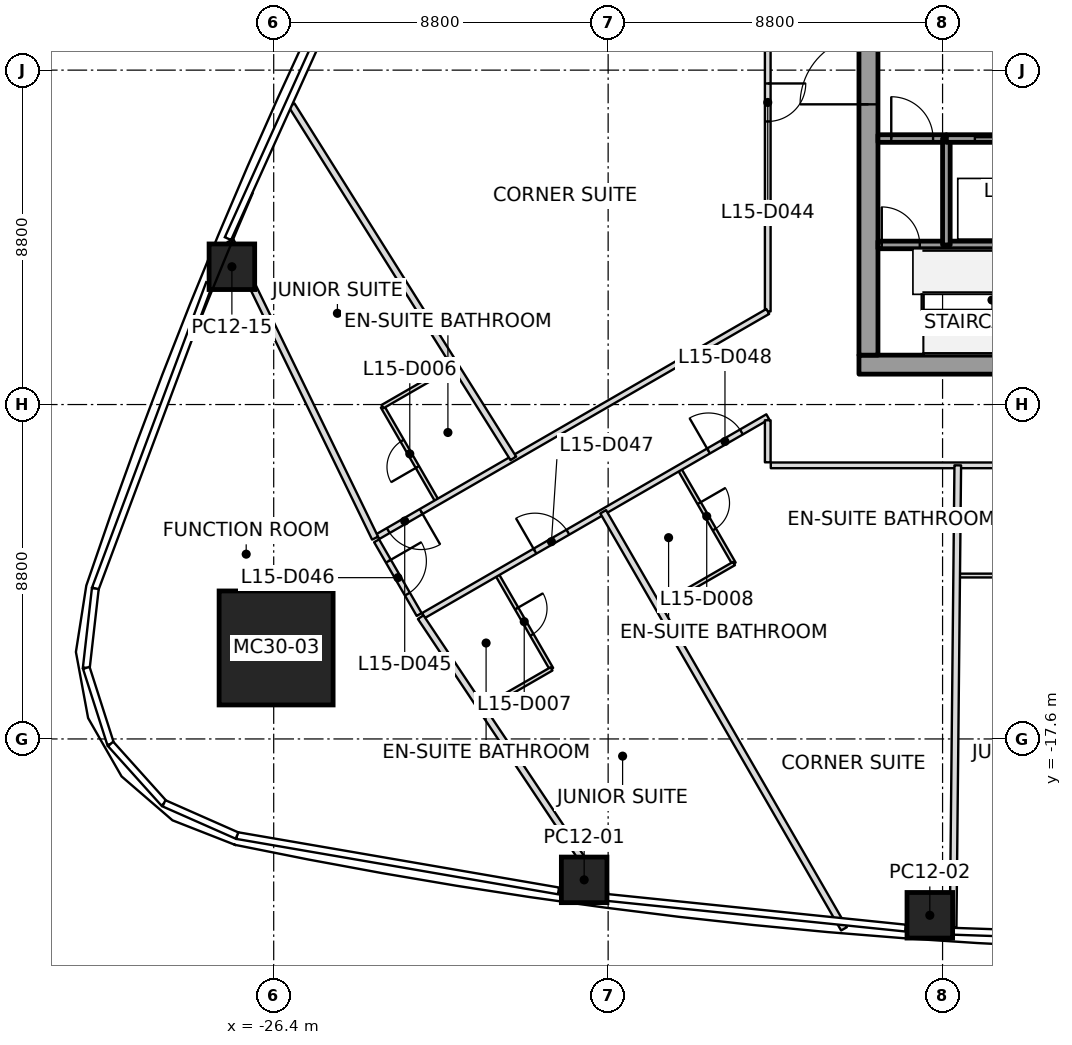
"""IFC4 building model, lengths in metres.
Left out: names, types, materials, properties, quantities, classifications, styles, units other than length and angle.
Written with IfcOpenShell. Run it as: python <this file> out.ifc"""

import sys

from ifc_helpers import new_model, si_unit, direction, frame, frame_2d, origin, origin_2d, place, context, subcontext, project, spatial, rectangle, extrude, clip, halfspace, element, fill, save


model = new_model("IFC4")
c1 = context("Model", 3, precision=1e-05, world=origin(), true_north=direction((0.0, 1.0)))
c2 = subcontext(c1, "Body", "Model", "MODEL_VIEW")
j1 = project(units=[si_unit("LENGTHUNIT", "METRE"), si_unit("PLANEANGLEUNIT", "RADIAN")], contexts=[c1])
p1 = place(None, origin())
s1 = spatial("IfcSite", under=j1, at=p1, CompositionType="ELEMENT")
p2 = place(p1, origin())
s2 = spatial("IfcBuilding", under=s1, at=p2, CompositionType="ELEMENT")
p3 = place(p2, frame((0.0, 0.0, 77.6)))
s3 = spatial("IfcBuildingStorey", under=s2, at=p3, CompositionType="ELEMENT", Elevation=77.6)
p4 = place(p3, frame((-26.337, -15.206, 0.0), z_axis=(0.030531956516, 0.017672925154, 0.999377539946), x_axis=(0.99953379114, -0.000539840661, -0.030527183636)))
e1 = element("IfcColumn", 1, at=p4, inside=s3, PredefinedType="COLUMN", context=c2, shape_type="SweptSolid", body=[
    extrude(rectangle(XDim=3.0, YDim=3.0, at=origin_2d()), origin(), (0.0, 0.0, 1.0), 3.702),
])
p5 = place(p3, frame((-18.231, -21.308, 0.0), z_axis=(0.019253687779, 0.03270489431, 0.999279583197), x_axis=(-0.990559922783, 0.136298030063, 0.014624854803)))
e2 = element("IfcColumn", 2, at=p5, inside=s3, PredefinedType="COLUMN", context=c2, shape_type="SweptSolid", body=[
    clip(clip(extrude(rectangle(XDim=1.2, YDim=1.2, at=origin_2d()), origin(), (0.0, 0.0, 1.0), 3.703), halfspace(frame((0.0, 0.0, 0.015)), True)), halfspace(frame((0.0, 0.0, 3.695)), False)),
])
p6 = place(p3, frame((-9.135, -22.24, 0.0), z_axis=(0.009625518264, 0.040282134652, 0.999141981415), x_axis=(-0.997637584902, 0.068353896392, 0.006855219842)))
e3 = element("IfcColumn", 3, at=p6, inside=s3, PredefinedType="COLUMN", context=c2, shape_type="SweptSolid", body=[
    clip(clip(extrude(rectangle(XDim=1.2, YDim=1.2, at=origin_2d()), origin(), (0.0, 0.0, 1.0), 3.703), halfspace(frame((0.0, 0.0, 0.018)), True)), halfspace(frame((0.0, 0.0, 3.694)), False)),
])
p7 = place(p3, frame((-27.5, -5.174, 0.0), z_axis=(0.019460655113, 0.011016709844, 0.999749926235), x_axis=(0.381127273401, 0.924354950562, -0.017604739188)))
e4 = element("IfcColumn", 4, at=p7, inside=s3, PredefinedType="COLUMN", context=c2, shape_type="SweptSolid", body=[
    extrude(rectangle(XDim=1.2, YDim=1.2, at=origin_2d()), origin(), (0.0, 0.0, 1.0), 3.701),
])
p8 = place(p3, frame((-11.0, -7.75, 0.0), z_axis=(0.0, 0.0, 1.0), x_axis=(1.0, 0.0, 0.0)))
e5 = element("IfcWall", 5, at=p8, inside=s3, PredefinedType="SHEAR", context=c2, shape_type="SweptSolid", body=[
    extrude(rectangle(XDim=22.0, YDim=0.5, at=frame_2d((11.0, 0.0))), origin(), (0.0, 0.0, 1.0), 3.7),
])
p9 = place(p8, frame((10.45, 0.0, 0.0)))
e6 = element("IfcOpeningElement", 6, at=p9, cuts=e5, PredefinedType="OPENING", context=c2, shape_type="SweptSolid", body=[
    extrude(rectangle(XDim=1.1, YDim=2.1, at=frame_2d((0.55, 1.05))), frame((0.0, 0.25, 0.0), z_axis=(0.0, -1.0, 0.0), x_axis=(1.0, 0.0, 0.0)), (0.0, 0.0, 1.0), 0.5),
])
p10 = place(p3, frame((-10.75, -7.5, 0.0), z_axis=(0.0, 0.0, 1.0), x_axis=(0.0, 1.0, 0.0)))
e7 = element("IfcWall", 7, at=p10, inside=s3, PredefinedType="SHEAR", context=c2, shape_type="SweptSolid", body=[
    extrude(rectangle(XDim=15.0, YDim=0.5, at=frame_2d((7.5, 0.0))), origin(), (0.0, 0.0, 1.0), 3.7),
])
p11 = place(p10, frame((6.6, 0.0, 0.0)))
e8 = element("IfcOpeningElement", 8, at=p11, cuts=e7, PredefinedType="OPENING", context=c2, shape_type="SweptSolid", body=[
    extrude(rectangle(XDim=1.8, YDim=2.1, at=frame_2d((0.9, 1.05))), frame((0.0, 0.25, 0.0), z_axis=(0.0, -1.0, 0.0), x_axis=(1.0, 0.0, 0.0)), (0.0, 0.0, 1.0), 0.5),
])
p12 = place(p3, frame((-10.5, -4.6, 0.0), z_axis=(0.0, 0.0, 1.0), x_axis=(1.0, 0.0, 0.0)))
e9 = element("IfcWall", 9, at=p12, inside=s3, PredefinedType="SOLIDWALL", context=c2, shape_type="SweptSolid", body=[
    extrude(rectangle(XDim=1.8, YDim=0.2, at=frame_2d((0.9, 0.0))), origin(), (0.0, 0.0, 1.0), 3.55),
])
p13 = place(p12, frame((0.1, 0.0, 0.0)))
e10 = element("IfcOpeningElement", 10, at=p13, cuts=e9, PredefinedType="OPENING", context=c2, shape_type="SweptSolid", body=[
    extrude(rectangle(XDim=1.0, YDim=2.1, at=frame_2d((0.5, 1.05))), frame((0.0, 0.1, 0.0), z_axis=(0.0, -1.0, 0.0), x_axis=(1.0, 0.0, 0.0)), (0.0, 0.0, 1.0), 0.2),
])
p14 = place(p3, frame((-10.5, -1.8, 0.0), z_axis=(0.0, 0.0, 1.0), x_axis=(1.0, 0.0, 0.0)))
e11 = element("IfcWall", 11, at=p14, inside=s3, PredefinedType="SOLIDWALL", context=c2, shape_type="SweptSolid", body=[
    extrude(rectangle(XDim=1.8, YDim=0.2, at=frame_2d((0.9, 0.0))), origin(), (0.0, 0.0, 1.0), 3.55),
])
p15 = place(p14, frame((0.35, 0.0, 0.0)))
e12 = element("IfcOpeningElement", 12, at=p15, cuts=e11, PredefinedType="OPENING", context=c2, shape_type="SweptSolid", body=[
    extrude(rectangle(XDim=1.1, YDim=2.1, at=frame_2d((0.55, 1.05))), frame((0.0, 0.1, 0.0), z_axis=(0.0, -1.0, 0.0), x_axis=(1.0, 0.0, 0.0)), (0.0, 0.0, 1.0), 0.2),
])
p16 = place(p3, frame((-8.7, -4.6, 0.0), z_axis=(0.0, 0.0, 1.0), x_axis=(1.0, 0.0, 0.0)))
e13 = element("IfcWall", 13, at=p16, inside=s3, PredefinedType="SOLIDWALL", context=c2, shape_type="SweptSolid", body=[
    extrude(rectangle(XDim=2.6, YDim=0.2, at=frame_2d((1.3, 0.0))), origin(), (0.0, 0.0, 1.0), 3.55),
])
p17 = place(p3, frame((-8.7, -4.6, 0.0), z_axis=(0.0, 0.0, 1.0), x_axis=(0.0, 1.0, 0.0)))
e14 = element("IfcWall", 14, at=p17, inside=s3, PredefinedType="SOLIDWALL", context=c2, shape_type="SweptSolid", body=[
    extrude(rectangle(XDim=2.8, YDim=0.2, at=frame_2d((1.4, 0.0))), origin(), (0.0, 0.0, 1.0), 3.55),
])
p18 = place(p3, frame((-8.7, -1.8, 0.0), z_axis=(0.0, 0.0, 1.0), x_axis=(1.0, 0.0, 0.0)))
e15 = element("IfcWall", 15, at=p18, inside=s3, PredefinedType="SOLIDWALL", context=c2, shape_type="SweptSolid", body=[
    extrude(rectangle(XDim=2.6, YDim=0.2, at=frame_2d((1.3, 0.0))), origin(), (0.0, 0.0, 1.0), 3.55),
])
p19 = place(p18, frame((0.75, 0.0, 0.0)))
e16 = element("IfcOpeningElement", 16, at=p19, cuts=e15, PredefinedType="OPENING", context=c2, shape_type="SweptSolid", body=[
    extrude(rectangle(XDim=1.1, YDim=2.1, at=frame_2d((0.55, 1.05))), frame((0.0, 0.1, 0.0), z_axis=(0.0, -1.0, 0.0), x_axis=(1.0, 0.0, 0.0)), (0.0, 0.0, 1.0), 0.2),
])
p20 = place(p3, frame((-23.732, -12.316, 0.0), z_axis=(0.0, 0.0, 1.0), x_axis=(-0.437347411192, 0.899292634198, 0.0)))
e17 = element("IfcWall", 17, at=p20, inside=s3, PredefinedType="PARTITIONING", context=c2, shape_type="SweptSolid", body=[
    extrude(rectangle(XDim=8.705, YDim=0.175, at=frame_2d((4.352, 0.0))), origin(), (0.0, 0.0, 1.0), 3.15),
])
p21 = place(p3, frame((-20.095, -10.216, 0.0), z_axis=(0.0, 0.0, 1.0), x_axis=(-0.531613758333, 0.846986901877, 0.0)))
e18 = element("IfcWall", 18, at=p21, inside=s3, PredefinedType="PARTITIONING", context=c2, shape_type="SweptSolid", body=[
    extrude(rectangle(XDim=10.974, YDim=0.175, at=frame_2d((5.487, 0.0))), origin(), (0.0, 0.0, 1.0), 2.934),
])
p22 = place(p3, frame((-17.669, -21.685, 0.0), z_axis=(0.0, 0.0, 1.0), x_axis=(-0.554931610564, 0.83189597162, 0.0)))
e19 = element("IfcWall", 19, at=p22, inside=s3, PredefinedType="PARTITIONING", context=c2, shape_type="SweptSolid", body=[
    extrude(rectangle(XDim=8.764, YDim=0.175, at=frame_2d((4.382, 0.0))), origin(), (0.0, 0.0, 1.0), 3.15),
])
p23 = place(p3, frame((-17.73, -11.622, 0.0), z_axis=(0.0, 0.0, 1.0), x_axis=(0.499984838248, -0.866034157249, 0.0)))
e20 = element("IfcWall", 20, at=p23, inside=s3, PredefinedType="PARTITIONING", context=c2, shape_type="SweptSolid", body=[
    extrude(rectangle(XDim=12.672, YDim=0.175, at=frame_2d((6.336, 0.0))), origin(), (0.0, 0.0, 1.0), 2.934),
])
p24 = place(p3, frame((-8.4, -10.4, 0.0), z_axis=(0.0, 0.0, 1.0), x_axis=(-0.010057712495, -0.999949419931, 0.0)))
e21 = element("IfcWall", 21, at=p24, inside=s3, PredefinedType="PARTITIONING", context=c2, shape_type="SweptSolid", body=[
    extrude(rectangle(XDim=12.161, YDim=0.175, at=frame_2d((6.081, 0.0))), origin(), (0.0, 0.0, 1.0), 2.934),
])
p25 = place(p3, frame((-23.692, -12.385, 0.0), z_axis=(0.0, 0.0, 1.0), x_axis=(0.49994888933, -0.866054910533, 0.0)))
e22 = element("IfcWall", 22, at=p25, inside=s3, PredefinedType="PARTITIONING", context=c2, shape_type="SweptSolid", body=[
    extrude(rectangle(XDim=2.24, YDim=0.15, at=frame_2d((1.12, 0.0))), origin(), (0.0, 0.0, 1.0), 2.797),
])
p26 = place(p25, frame((0.62, 0.0, 0.0)))
e23 = element("IfcOpeningElement", 23, at=p26, cuts=e22, PredefinedType="OPENING", context=c2, shape_type="SweptSolid", body=[
    extrude(rectangle(XDim=1.0, YDim=2.1, at=frame_2d((0.5, 1.05))), frame((0.0, 0.075, 0.0), z_axis=(0.0, -1.0, 0.0), x_axis=(1.0, 0.0, 0.0)), (0.0, 0.0, 1.0), 0.15),
])
p27 = place(p3, frame((-13.4, 10.32, 0.0), z_axis=(0.0, 0.0, 1.0), x_axis=(0.0, -1.0, 0.0)))
e24 = element("IfcWall", 24, at=p27, inside=s3, PredefinedType="PARTITIONING", context=c2, shape_type="SweptSolid", body=[
    extrude(rectangle(XDim=16.671, YDim=0.15, at=frame_2d((8.335, 0.0))), origin(), (0.0, 0.0, 1.0), 2.947),
])
p28 = place(p27, frame((1.095, 0.0, 0.0)))
e25 = element("IfcOpeningElement", 25, at=p28, cuts=e24, PredefinedType="OPENING", context=c2, shape_type="SweptSolid", body=[
    extrude(rectangle(XDim=1.0, YDim=2.1, at=frame_2d((0.5, 1.05))), frame((0.0, 0.075, 0.0), z_axis=(0.0, -1.0, 0.0), x_axis=(1.0, 0.0, 0.0)), (0.0, 0.0, 1.0), 0.15),
])
p29 = place(p27, frame((10.671, 0.0, 0.0)))
e26 = element("IfcOpeningElement", 26, at=p29, cuts=e24, PredefinedType="OPENING", context=c2, shape_type="SweptSolid", body=[
    extrude(rectangle(XDim=1.0, YDim=2.1, at=frame_2d((0.5, 1.05))), frame((0.0, 0.075, 0.0), z_axis=(0.0, -1.0, 0.0), x_axis=(1.0, 0.0, 0.0)), (0.0, 0.0, 1.0), 0.15),
])
p30 = place(p3, frame((-13.4, -6.351, 0.0), z_axis=(0.0, 0.0, 1.0), x_axis=(-0.866031207587, -0.499989947384, 0.0)))
e27 = element("IfcWall", 27, at=p30, inside=s3, PredefinedType="PARTITIONING", context=c2, shape_type="SweptSolid", body=[
    extrude(rectangle(XDim=11.851, YDim=0.15, at=frame_2d((5.925, 0.0))), origin(), (0.0, 0.0, 1.0), 2.947),
])
p31 = place(p30, frame((10.531, 0.0, 0.0)))
e28 = element("IfcOpeningElement", 28, at=p31, cuts=e27, PredefinedType="OPENING", context=c2, shape_type="SweptSolid", body=[
    extrude(rectangle(XDim=1.0, YDim=2.1, at=frame_2d((0.5, 1.05))), frame((0.0, 0.075, 0.0), z_axis=(0.0, -1.0, 0.0), x_axis=(1.0, 0.0, 0.0)), (0.0, 0.0, 1.0), 0.15),
])
p32 = place(p3, frame((-22.463, -14.355, 0.0), z_axis=(0.0, 0.0, 1.0), x_axis=(0.86602514158, 0.500000454152, 0.0)))
e29 = element("IfcWall", 29, at=p32, inside=s3, PredefinedType="PARTITIONING", context=c2, shape_type="SweptSolid", body=[
    extrude(rectangle(XDim=10.465, YDim=0.15, at=frame_2d((5.233, 0.0))), origin(), (0.0, 0.0, 1.0), 2.797),
])
p33 = place(p32, frame((3.393, 0.0, 0.0)))
e30 = element("IfcOpeningElement", 30, at=p33, cuts=e29, PredefinedType="OPENING", context=c2, shape_type="SweptSolid", body=[
    extrude(rectangle(XDim=1.0, YDim=2.1, at=frame_2d((0.5, 1.05))), frame((0.0, 0.075, 0.0), z_axis=(0.0, -1.0, 0.0), x_axis=(1.0, 0.0, 0.0)), (0.0, 0.0, 1.0), 0.15),
])
p34 = place(p32, frame((8.665, 0.0, 0.0)))
e31 = element("IfcOpeningElement", 31, at=p34, cuts=e29, PredefinedType="OPENING", context=c2, shape_type="SweptSolid", body=[
    extrude(rectangle(XDim=1.0, YDim=2.1, at=frame_2d((0.5, 1.05))), frame((0.0, 0.075, 0.0), z_axis=(0.0, -1.0, 0.0), x_axis=(1.0, 0.0, 0.0)), (0.0, 0.0, 1.0), 0.15),
])
p35 = place(p3, frame((-13.4, -9.214, 0.0), z_axis=(0.0, 0.0, 1.0), x_axis=(0.0, -1.0, 0.0)))
e32 = element("IfcWall", 32, at=p35, inside=s3, PredefinedType="PARTITIONING", context=c2, shape_type="SweptSolid", body=[
    extrude(rectangle(XDim=1.106, YDim=0.15, at=frame_2d((0.553, 0.0))), origin(), (0.0, 0.0, 1.0), 2.797),
])
p36 = place(p3, frame((-13.32, -10.4, 0.0), z_axis=(0.0, 0.0, 1.0), x_axis=(1.0, 0.0, 0.0)))
e33 = element("IfcWall", 33, at=p36, inside=s3, PredefinedType="PARTITIONING", context=c2, shape_type="SweptSolid", body=[
    extrude(rectangle(XDim=26.64, YDim=0.15, at=frame_2d((13.32, 0.0))), origin(), (0.0, 0.0, 1.0), 2.947),
])
p37 = place(p36, frame((7.72, 0.0, 0.0)))
e34 = element("IfcOpeningElement", 34, at=p37, cuts=e33, PredefinedType="OPENING", context=c2, shape_type="SweptSolid", body=[
    extrude(rectangle(XDim=1.0, YDim=2.1, at=frame_2d((0.5, 1.05))), frame((0.0, 0.075, 0.0), z_axis=(0.0, -1.0, 0.0), x_axis=(1.0, 0.0, 0.0)), (0.0, 0.0, 1.0), 0.15),
])
p38 = place(p36, frame((11.92, 0.0, 0.0)))
e35 = element("IfcOpeningElement", 35, at=p38, cuts=e33, PredefinedType="OPENING", context=c2, shape_type="SweptSolid", body=[
    extrude(rectangle(XDim=1.0, YDim=2.1, at=frame_2d((0.5, 1.05))), frame((0.0, 0.075, 0.0), z_axis=(0.0, -1.0, 0.0), x_axis=(1.0, 0.0, 0.0)), (0.0, 0.0, 1.0), 0.15),
])
p39 = place(p36, frame((16.52, 0.0, 0.0)))
e36 = element("IfcOpeningElement", 36, at=p39, cuts=e33, PredefinedType="OPENING", context=c2, shape_type="SweptSolid", body=[
    extrude(rectangle(XDim=1.0, YDim=2.1, at=frame_2d((0.5, 1.05))), frame((0.0, 0.075, 0.0), z_axis=(0.0, -1.0, 0.0), x_axis=(1.0, 0.0, 0.0)), (0.0, 0.0, 1.0), 0.15),
])
p40 = place(p36, frame((21.12, 0.0, 0.0)))
e37 = element("IfcOpeningElement", 37, at=p40, cuts=e33, PredefinedType="OPENING", context=c2, shape_type="SweptSolid", body=[
    extrude(rectangle(XDim=1.0, YDim=2.1, at=frame_2d((0.5, 1.05))), frame((0.0, 0.075, 0.0), z_axis=(0.0, -1.0, 0.0), x_axis=(1.0, 0.0, 0.0)), (0.0, 0.0, 1.0), 0.15),
])
p41 = place(p3, frame((-22.102, -11.34, 0.0), z_axis=(0.0, 0.0, 1.0), x_axis=(-0.499999802827, 0.866025517622, 0.0)))
e38 = element("IfcWall", 38, at=p41, inside=s3, PredefinedType="PARTITIONING", context=c2, shape_type="SweptSolid", body=[
    extrude(rectangle(XDim=2.87, YDim=0.1, at=frame_2d((1.435, 0.0))), origin(), (0.0, 0.0, 1.0), 3.15),
])
p42 = place(p41, frame((1.035, 0.0, 0.0)))
e39 = element("IfcOpeningElement", 39, at=p42, cuts=e38, PredefinedType="OPENING", context=c2, shape_type="SweptSolid", body=[
    extrude(rectangle(XDim=0.8, YDim=2.1, at=frame_2d((0.4, 1.05))), frame((0.0, 0.05, 0.0), z_axis=(0.0, -1.0, 0.0), x_axis=(1.0, 0.0, 0.0)), (0.0, 0.0, 1.0), 0.1),
])
p43 = place(p3, frame((-23.537, -8.855, 0.0), z_axis=(0.0, 0.0, 1.0), x_axis=(0.866017224141, 0.500014167291, 0.0)))
e40 = element("IfcWall", 40, at=p43, inside=s3, PredefinedType="PARTITIONING", context=c2, shape_type="SweptSolid", body=[
    extrude(rectangle(XDim=2.27, YDim=0.1, at=frame_2d((1.135, 0.0))), origin(), (0.0, 0.0, 1.0), 3.15),
])
p44 = place(p3, frame((-20.525, -13.271, 0.0), z_axis=(0.0, 0.0, 1.0), x_axis=(0.499972835562, -0.866041086612, 0.0)))
e41 = element("IfcWall", 41, at=p44, inside=s3, PredefinedType="PARTITIONING", context=c2, shape_type="SweptSolid", body=[
    extrude(rectangle(XDim=2.87, YDim=0.1, at=frame_2d((1.435, 0.0))), origin(), (0.0, 0.0, 1.0), 3.15),
])
p45 = place(p44, frame((1.035, 0.0, 0.0)))
e42 = element("IfcOpeningElement", 42, at=p45, cuts=e41, PredefinedType="OPENING", context=c2, shape_type="SweptSolid", body=[
    extrude(rectangle(XDim=0.8, YDim=2.1, at=frame_2d((0.4, 1.05))), frame((0.0, 0.05, 0.0), z_axis=(0.0, -1.0, 0.0), x_axis=(1.0, 0.0, 0.0)), (0.0, 0.0, 1.0), 0.1),
])
p46 = place(p3, frame((-19.091, -15.756, 0.0), z_axis=(0.0, 0.0, 1.0), x_axis=(-0.866017224141, -0.500014167291, 0.0)))
e43 = element("IfcWall", 43, at=p46, inside=s3, PredefinedType="PARTITIONING", context=c2, shape_type="SweptSolid", body=[
    extrude(rectangle(XDim=2.27, YDim=0.1, at=frame_2d((1.135, 0.0))), origin(), (0.0, 0.0, 1.0), 3.15),
])
p47 = place(p3, frame((-15.723, -10.498, 0.0), z_axis=(0.0, 0.0, 1.0), x_axis=(0.499999802827, -0.866025517622, 0.0)))
e44 = element("IfcWall", 44, at=p47, inside=s3, PredefinedType="PARTITIONING", context=c2, shape_type="SweptSolid", body=[
    extrude(rectangle(XDim=2.87, YDim=0.1, at=frame_2d((1.435, 0.0))), origin(), (0.0, 0.0, 1.0), 2.797),
])
p48 = place(p47, frame((1.035, 0.0, 0.0)))
e45 = element("IfcOpeningElement", 45, at=p48, cuts=e44, PredefinedType="OPENING", context=c2, shape_type="SweptSolid", body=[
    extrude(rectangle(XDim=0.8, YDim=2.1, at=frame_2d((0.4, 1.05))), frame((0.0, 0.05, 0.0), z_axis=(0.0, -1.0, 0.0), x_axis=(1.0, 0.0, 0.0)), (0.0, 0.0, 1.0), 0.1),
])
p49 = place(p3, frame((-14.288, -12.984, 0.0), z_axis=(0.0, 0.0, 1.0), x_axis=(-0.866017224141, -0.500014167291, 0.0)))
e46 = element("IfcWall", 46, at=p49, inside=s3, PredefinedType="PARTITIONING", context=c2, shape_type="SweptSolid", body=[
    extrude(rectangle(XDim=2.27, YDim=0.1, at=frame_2d((1.135, 0.0))), origin(), (0.0, 0.0, 1.0), 3.093),
])
p50 = place(p3, frame((-6.1, -13.3, 0.0), z_axis=(0.0, 0.0, 1.0), x_axis=(-1.0, 0.0, 0.0)))
e47 = element("IfcWall", 47, at=p50, inside=s3, PredefinedType="PARTITIONING", context=c2, shape_type="SweptSolid", body=[
    extrude(rectangle(XDim=2.27, YDim=0.1, at=frame_2d((1.135, 0.0))), origin(), (0.0, 0.0, 1.0), 3.15),
])
p51 = place(p29, origin())
e48 = element("IfcDoor", 48, at=p51, inside=s3, OperationType="SINGLE_SWING_RIGHT", PredefinedType="DOOR", context=c2, shape_type="SweptSolid", body=[
    extrude(rectangle(XDim=1.0, YDim=2.1, at=frame_2d((0.5, 1.05))), frame((0.0, 0.025, 0.0), z_axis=(0.0, -1.0, 0.0), x_axis=(1.0, 0.0, 0.0)), (0.0, 0.0, 1.0), 0.05),
])
fill(e26, e48)
p52 = place(p31, origin())
e49 = element("IfcDoor", 49, at=p52, inside=s3, OperationType="SINGLE_SWING_LEFT", PredefinedType="DOOR", context=c2, shape_type="SweptSolid", body=[
    extrude(rectangle(XDim=1.0, YDim=2.1, at=frame_2d((0.5, 1.05))), frame((0.0, 0.025, 0.0), z_axis=(0.0, -1.0, 0.0), x_axis=(1.0, 0.0, 0.0)), (0.0, 0.0, 1.0), 0.05),
])
fill(e28, e49)
p53 = place(p42, origin())
e50 = element("IfcDoor", 50, at=p53, inside=s3, OperationType="SINGLE_SWING_LEFT", PredefinedType="DOOR", context=c2, shape_type="SweptSolid", body=[
    extrude(rectangle(XDim=0.8, YDim=2.1, at=frame_2d((0.4, 1.05))), frame((0.0, 0.025, 0.0), z_axis=(0.0, -1.0, 0.0), x_axis=(1.0, 0.0, 0.0)), (0.0, 0.0, 1.0), 0.05),
])
fill(e39, e50)
p54 = place(p26, origin())
e51 = element("IfcDoor", 51, at=p54, inside=s3, OperationType="SINGLE_SWING_RIGHT", PredefinedType="DOOR", context=c2, shape_type="SweptSolid", body=[
    extrude(rectangle(XDim=1.0, YDim=2.1, at=frame_2d((0.5, 1.05))), frame((0.0, 0.025, 0.0), z_axis=(0.0, -1.0, 0.0), x_axis=(1.0, 0.0, 0.0)), (0.0, 0.0, 1.0), 0.05),
])
fill(e23, e51)
p55 = place(p33, origin())
e52 = element("IfcDoor", 52, at=p55, inside=s3, OperationType="SINGLE_SWING_LEFT", PredefinedType="DOOR", context=c2, shape_type="SweptSolid", body=[
    extrude(rectangle(XDim=1.0, YDim=2.1, at=frame_2d((0.5, 1.05))), frame((0.0, 0.025, 0.0), z_axis=(0.0, -1.0, 0.0), x_axis=(1.0, 0.0, 0.0)), (0.0, 0.0, 1.0), 0.05),
])
fill(e30, e52)
p56 = place(p45, origin())
e53 = element("IfcDoor", 53, at=p56, inside=s3, OperationType="SINGLE_SWING_RIGHT", PredefinedType="DOOR", context=c2, shape_type="SweptSolid", body=[
    extrude(rectangle(XDim=0.8, YDim=2.1, at=frame_2d((0.4, 1.05))), frame((0.0, 0.025, 0.0), z_axis=(0.0, -1.0, 0.0), x_axis=(1.0, 0.0, 0.0)), (0.0, 0.0, 1.0), 0.05),
])
fill(e42, e53)
p57 = place(p34, origin())
e54 = element("IfcDoor", 54, at=p57, inside=s3, OperationType="SINGLE_SWING_LEFT", PredefinedType="DOOR", context=c2, shape_type="SweptSolid", body=[
    extrude(rectangle(XDim=1.0, YDim=2.1, at=frame_2d((0.5, 1.05))), frame((0.0, 0.025, 0.0), z_axis=(0.0, -1.0, 0.0), x_axis=(1.0, 0.0, 0.0)), (0.0, 0.0, 1.0), 0.05),
])
fill(e31, e54)
p58 = place(p48, origin())
e55 = element("IfcDoor", 55, at=p58, inside=s3, OperationType="SINGLE_SWING_LEFT", PredefinedType="DOOR", context=c2, shape_type="SweptSolid", body=[
    extrude(rectangle(XDim=0.8, YDim=2.1, at=frame_2d((0.4, 1.05))), frame((0.0, 0.025, 0.0), z_axis=(0.0, -1.0, 0.0), x_axis=(1.0, 0.0, 0.0)), (0.0, 0.0, 1.0), 0.05),
])
fill(e45, e55)
p59 = place(p19, origin())
e56 = element("IfcDoor", 56, at=p59, inside=s3, OperationType="SLIDING_TO_RIGHT", PredefinedType="DOOR", context=c2, shape_type="SweptSolid", body=[
    extrude(rectangle(XDim=1.1, YDim=2.1, at=frame_2d((0.55, 1.05))), frame((0.0, 0.025, 0.0), z_axis=(0.0, -1.0, 0.0), x_axis=(1.0, 0.0, 0.0)), (0.0, 0.0, 1.0), 0.05),
])
fill(e16, e56)
p60 = place(p15, origin())
e57 = element("IfcDoor", 57, at=p60, inside=s3, OperationType="SINGLE_SWING_LEFT", PredefinedType="DOOR", context=c2, shape_type="SweptSolid", body=[
    extrude(rectangle(XDim=1.1, YDim=2.1, at=frame_2d((0.55, 1.05))), frame((0.0, 0.025, 0.0), z_axis=(0.0, -1.0, 0.0), x_axis=(1.0, 0.0, 0.0)), (0.0, 0.0, 1.0), 0.05),
])
fill(e12, e57)
p61 = place(p13, origin())
e58 = element("IfcDoor", 58, at=p61, inside=s3, OperationType="SINGLE_SWING_LEFT", PredefinedType="DOOR", context=c2, shape_type="SweptSolid", body=[
    extrude(rectangle(XDim=1.0, YDim=2.1, at=frame_2d((0.5, 1.05))), frame((0.0, 0.025, 0.0), z_axis=(0.0, -1.0, 0.0), x_axis=(1.0, 0.0, 0.0)), (0.0, 0.0, 1.0), 0.05),
])
fill(e10, e58)
p62 = place(p11, origin())
e59 = element("IfcDoor", 59, at=p62, inside=s3, OperationType="DOUBLE_DOOR_SINGLE_SWING", PredefinedType="DOOR", context=c2, shape_type="SweptSolid", body=[
    extrude(rectangle(XDim=1.8, YDim=2.1, at=frame_2d((0.9, 1.05))), frame((0.0, 0.025, 0.0), z_axis=(0.0, -1.0, 0.0), x_axis=(1.0, 0.0, 0.0)), (0.0, 0.0, 1.0), 0.05),
])
fill(e8, e59)
save(model, sys.argv[1])
